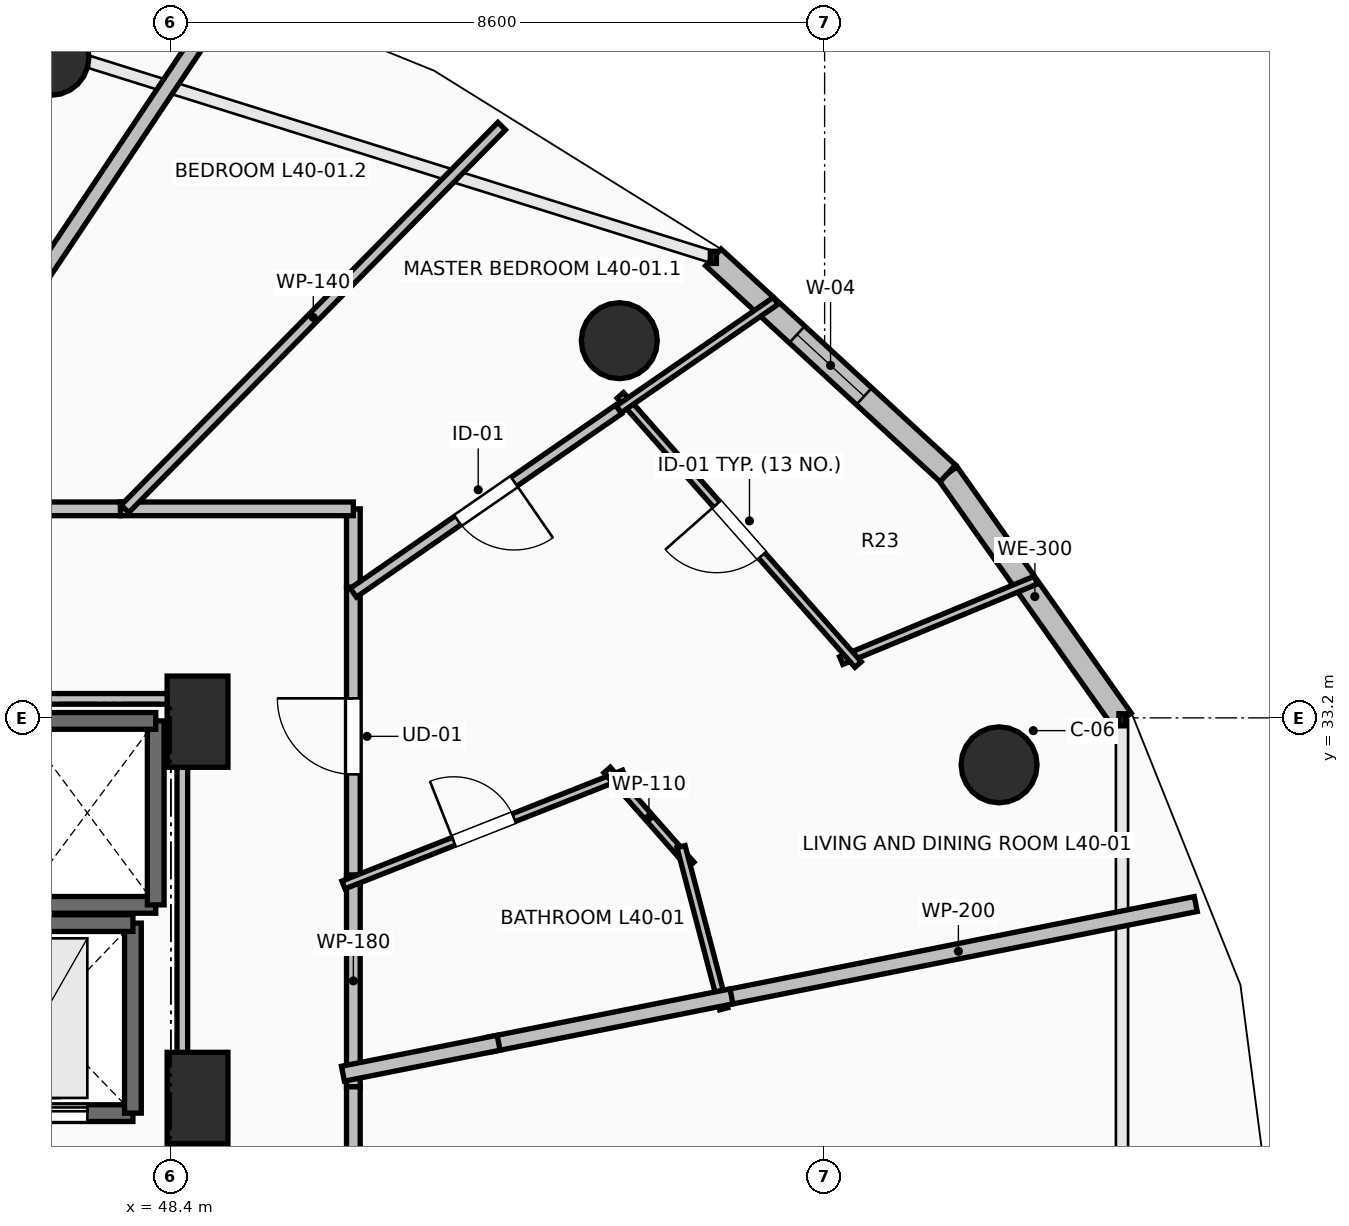
"""IFC4 building model, lengths in metres.
Left out: names, types, materials, properties, quantities, classifications, styles, units other than length and angle.
Written with IfcOpenShell. Run it as: python <this file> out.ifc"""

import sys

from ifc_helpers import new_model, si_unit, direction, frame, frame_2d, origin, origin_2d, place, context, subcontext, project, spatial, rectangle, circle, extrude, element, fill, save


model = new_model("IFC4")
c1 = context("Model", 3, precision=1e-05, world=origin(), true_north=direction((0.0, 1.0)))
c2 = subcontext(c1, "Body", "Model", "MODEL_VIEW")
j1 = project(units=[si_unit("LENGTHUNIT", "METRE"), si_unit("PLANEANGLEUNIT", "RADIAN")], contexts=[c1])
p1 = place(None, origin())
s1 = spatial("IfcSite", under=j1, at=p1, CompositionType="ELEMENT")
p2 = place(p1, origin())
s2 = spatial("IfcBuilding", under=s1, at=p2, CompositionType="ELEMENT")
p3 = place(p2, frame((0.0, 0.0, 150.1)))
s3 = spatial("IfcBuildingStorey", under=s2, at=p3, CompositionType="ELEMENT", Elevation=150.1)
for number, where, z_axis, x_axis in (
    (1, (59.295, 32.582, 0.0), (0.0, 0.0, 1.0), (0.924, 0.383, 0.0)),
    (2, (54.299, 38.162, 0.0), (0.0, 0.0, 1.0), (0.707, 0.707, 0.0)),
    (3, (46.821, 41.891, 0.0), (0.0, 0.0, 1.0), (0.383, 0.924, 0.0)),
):
    element("IfcColumn", number, at=place(p3, frame(where, z_axis=z_axis, x_axis=x_axis)), inside=s3, PredefinedType="COLUMN", context=c2, shape_type="SweptSolid", body=[
        extrude(circle(Radius=0.5, at=origin_2d()), origin(), (0.0, 0.0, 1.0), 3.5),
    ])
for number, where, z_axis, x_axis in (
    (4, (48.75, 33.15, 0.0), (0.0, 0.0, 1.0), (1.0, 0.0, 0.0)),
    (5, (48.75, 28.2, 0.0), (0.0, 0.0, 1.0), (1.0, 0.0, 0.0)),
):
    element("IfcColumn", number, at=place(p3, frame(where, z_axis=z_axis, x_axis=x_axis)), inside=s3, PredefinedType="PILASTER", context=c2, shape_type="SweptSolid", body=[
        extrude(rectangle(XDim=0.8, YDim=1.2, at=origin_2d()), origin(), (0.0, 0.0, 1.0), 3.5),
    ])
p4 = place(p3, frame((60.912, 33.175, 0.0), z_axis=(0.0, 0.0, 1.0), x_axis=(-0.577269753207, 0.816553508371, 0.0)))
e6 = element("IfcWall", 6, at=p4, inside=s3, PredefinedType="STANDARD", context=c2, shape_type="SweptSolid", body=[
    extrude(rectangle(XDim=3.97, YDim=0.3, at=frame_2d((1.985, 0.0))), origin(), (0.0, 0.0, 1.0), 3.24),
])
p5 = place(p3, frame((58.62, 36.417, 0.0), z_axis=(0.0, 0.0, 1.0), x_axis=(-0.735477154165, 0.677549522693, 0.0)))
e7 = element("IfcWall", 7, at=p5, inside=s3, PredefinedType="STANDARD", context=c2, shape_type="SweptSolid", body=[
    extrude(rectangle(XDim=4.194, YDim=0.3, at=frame_2d((2.097, 0.0))), origin(), (0.0, 0.0, 1.0), 3.24),
])
p6 = place(p5, frame((1.497, 0.0, 0.85)))
e8 = element("IfcOpeningElement", 8, at=p6, cuts=e7, PredefinedType="OPENING", context=c2, shape_type="SweptSolid", body=[
    extrude(rectangle(XDim=1.2, YDim=2.1, at=frame_2d((0.6, 1.05))), frame((0.0, 0.165, 0.0), z_axis=(0.0, -1.0, 0.0), x_axis=(1.0, 0.0, 0.0)), (0.0, 0.0, 1.0), 0.33),
])
p7 = place(p3, frame((46.4, 30.74, 0.0), z_axis=(0.0, 0.0, 1.0), x_axis=(1.0, 0.0, 0.0)))
e9 = element("IfcWall", 9, at=p7, inside=s3, PredefinedType="SOLIDWALL", context=c2, shape_type="SweptSolid", body=[
    extrude(rectangle(XDim=1.8, YDim=0.22, at=frame_2d((0.9, 0.0))), origin(), (0.0, 0.0, 1.0), 3.24),
])
p8 = place(p3, frame((48.2, 30.74, 0.0), z_axis=(0.0, 0.0, 1.0), x_axis=(0.0, 1.0, 0.0)))
e10 = element("IfcWall", 10, at=p8, inside=s3, PredefinedType="SOLIDWALL", context=c2, shape_type="SweptSolid", body=[
    extrude(rectangle(XDim=2.42, YDim=0.22, at=frame_2d((1.21, 0.0))), origin(), (0.0, 0.0, 1.0), 3.24),
])
p9 = place(p3, frame((48.2, 33.16, 0.0), z_axis=(0.0, 0.0, 1.0), x_axis=(-1.0, 0.0, 0.0)))
e11 = element("IfcWall", 11, at=p9, inside=s3, PredefinedType="SOLIDWALL", context=c2, shape_type="SweptSolid", body=[
    extrude(rectangle(XDim=1.8, YDim=0.22, at=frame_2d((0.9, 0.0))), origin(), (0.0, 0.0, 1.0), 3.24),
])
p10 = place(p3, frame((45.5, 28.0, 0.0), z_axis=(0.0, 0.0, 1.0), x_axis=(1.0, 0.0, 0.0)))
e12 = element("IfcWall", 12, at=p10, inside=s3, PredefinedType="SHEAR", context=c2, shape_type="SweptSolid", body=[
    extrude(rectangle(XDim=2.4, YDim=0.22, at=frame_2d((1.2, 0.0))), origin(), (0.0, 0.0, 1.0), 3.24),
])
p11 = place(p10, frame((0.6, 0.0, 0.0)))
e13 = element("IfcOpeningElement", 13, at=p11, cuts=e12, PredefinedType="OPENING", context=c2, shape_type="SweptSolid", body=[
    extrude(rectangle(XDim=1.2, YDim=2.2, at=frame_2d((0.6, 1.1))), frame((0.0, 0.125, 0.0), z_axis=(0.0, -1.0, 0.0), x_axis=(1.0, 0.0, 0.0)), (0.0, 0.0, 1.0), 0.25),
])
p12 = place(p3, frame((47.9, 28.0, 0.0), z_axis=(0.0, 0.0, 1.0), x_axis=(0.0, 1.0, 0.0)))
e14 = element("IfcWall", 14, at=p12, inside=s3, PredefinedType="SHEAR", context=c2, shape_type="SweptSolid", body=[
    extrude(rectangle(XDim=2.5, YDim=0.22, at=frame_2d((1.25, 0.0))), origin(), (0.0, 0.0, 1.0), 3.24),
])
p13 = place(p3, frame((47.9, 30.5, 0.0), z_axis=(0.0, 0.0, 1.0), x_axis=(-1.0, 0.0, 0.0)))
e15 = element("IfcWall", 15, at=p13, inside=s3, PredefinedType="SHEAR", context=c2, shape_type="SweptSolid", body=[
    extrude(rectangle(XDim=2.4, YDim=0.22, at=frame_2d((1.2, 0.0))), origin(), (0.0, 0.0, 1.0), 3.24),
])
p14 = place(p3, frame((48.45, 23.95, 0.0), z_axis=(0.0, 0.0, 1.0), x_axis=(0.0, 1.0, 0.0)))
e16 = element("IfcWall", 16, at=p14, inside=s3, PredefinedType="PARTITIONING", context=c2, shape_type="SweptSolid", body=[
    extrude(rectangle(XDim=4.05, YDim=0.18, at=frame_2d((2.025, 0.0))), origin(), (0.0, 0.0, 1.0), 3.24),
])
p15 = place(p14, frame((1.425, 0.0, 0.0)))
e17 = element("IfcOpeningElement", 17, at=p15, cuts=e16, PredefinedType="OPENING", context=c2, shape_type="SweptSolid", body=[
    extrude(rectangle(XDim=1.2, YDim=2.15, at=frame_2d((0.6, 1.075))), frame((0.0, 0.105, 0.0), z_axis=(0.0, -1.0, 0.0), x_axis=(1.0, 0.0, 0.0)), (0.0, 0.0, 1.0), 0.21),
])
p16 = place(p3, frame((50.8, 30.994, 0.0), z_axis=(0.0, 0.0, 1.0), x_axis=(0.0, 1.0, 0.0)))
e18 = element("IfcWall", 18, at=p16, inside=s3, PredefinedType="PARTITIONING", context=c2, shape_type="SweptSolid", body=[
    extrude(rectangle(XDim=3.926, YDim=0.18, at=frame_2d((1.963, 0.0))), origin(), (0.0, 0.0, 1.0), 2.432),
])
p17 = place(p16, frame((1.463, 0.0, 0.0)))
e19 = element("IfcOpeningElement", 19, at=p17, cuts=e18, PredefinedType="OPENING", context=c2, shape_type="SweptSolid", body=[
    extrude(rectangle(XDim=1.0, YDim=2.15, at=frame_2d((0.5, 1.075))), frame((0.0, 0.105, 0.0), z_axis=(0.0, -1.0, 0.0), x_axis=(1.0, 0.0, 0.0)), (0.0, 0.0, 1.0), 0.21),
])
p18 = place(p3, frame((50.8, 28.346, 0.0), z_axis=(0.0, 0.0, 1.0), x_axis=(0.0, 1.0, 0.0)))
e20 = element("IfcWall", 20, at=p18, inside=s3, PredefinedType="PARTITIONING", context=c2, shape_type="SweptSolid", body=[
    extrude(rectangle(XDim=2.788, YDim=0.18, at=frame_2d((1.394, 0.0))), origin(), (0.0, 0.0, 1.0), 3.24),
])
p19 = place(p3, frame((50.8, 34.92, 0.0), z_axis=(0.0, 0.0, 1.0), x_axis=(0.0, 1.0, 0.0)))
e21 = element("IfcWall", 21, at=p19, inside=s3, PredefinedType="PARTITIONING", context=c2, shape_type="SweptSolid", body=[
    extrude(rectangle(XDim=1.03, YDim=0.18, at=frame_2d((0.515, 0.0))), origin(), (0.0, 0.0, 1.0), 2.432),
])
p20 = place(p3, frame((50.8, 35.95, 0.0), z_axis=(0.0, 0.0, 1.0), x_axis=(-1.0, 0.0, 0.0)))
e22 = element("IfcWall", 22, at=p20, inside=s3, PredefinedType="PARTITIONING", context=c2, shape_type="SweptSolid", body=[
    extrude(rectangle(XDim=3.065, YDim=0.18, at=frame_2d((1.532, 0.0))), origin(), (0.0, 0.0, 1.0), 2.432),
])
p21 = place(p3, frame((47.735, 35.95, 0.0), z_axis=(0.0, 0.0, 1.0), x_axis=(-1.0, 0.0, 0.0)))
e23 = element("IfcWall", 23, at=p21, inside=s3, PredefinedType="PARTITIONING", context=c2, shape_type="SweptSolid", body=[
    extrude(rectangle(XDim=3.147, YDim=0.18, at=frame_2d((1.574, 0.0))), origin(), (0.0, 0.0, 1.0), 2.886),
])
p22 = place(p21, frame((1.148, 0.0, 0.0)))
e24 = element("IfcOpeningElement", 24, at=p22, cuts=e23, PredefinedType="OPENING", context=c2, shape_type="SweptSolid", body=[
    extrude(rectangle(XDim=0.85, YDim=2.1, at=frame_2d((0.425, 1.05))), frame((0.0, 0.105, 0.0), z_axis=(0.0, -1.0, 0.0), x_axis=(1.0, 0.0, 0.0)), (0.0, 0.0, 1.0), 0.21),
])
p23 = place(p3, frame((50.8, 27.25, 0.0), z_axis=(0.0, 0.0, 1.0), x_axis=(0.0, 1.0, 0.0)))
e25 = element("IfcWall", 25, at=p23, inside=s3, PredefinedType="PARTITIONING", context=c2, shape_type="SweptSolid", body=[
    extrude(rectangle(XDim=1.096, YDim=0.18, at=frame_2d((0.548, 0.0))), origin(), (0.0, 0.0, 1.0), 2.432),
])
p24 = place(p3, frame((50.67, 31.003, 0.0), z_axis=(0.0, 0.0, 1.0), x_axis=(0.930092731386, 0.367324803169, 0.0)))
e26 = element("IfcWall", 26, at=p24, inside=s3, PredefinedType="PARTITIONING", context=c2, shape_type="SweptSolid", body=[
    extrude(rectangle(XDim=3.969, YDim=0.11, at=frame_2d((1.984, 0.0))), origin(), (0.0, 0.0, 1.0), 2.886),
])
p25 = place(p24, frame((1.559, 0.0, 0.0)))
e27 = element("IfcOpeningElement", 27, at=p25, cuts=e26, PredefinedType="OPENING", context=c2, shape_type="SweptSolid", body=[
    extrude(rectangle(XDim=0.85, YDim=2.1, at=frame_2d((0.425, 1.05))), frame((0.0, 0.07, 0.0), z_axis=(0.0, -1.0, 0.0), x_axis=(1.0, 0.0, 0.0)), (0.0, 0.0, 1.0), 0.14),
])
p26 = place(p3, frame((54.138, 32.514, 0.0), z_axis=(0.0, 0.0, 1.0), x_axis=(0.661645897528, -0.749816448396, 0.0)))
e28 = element("IfcWall", 28, at=p26, inside=s3, PredefinedType="PARTITIONING", context=c2, shape_type="SweptSolid", body=[
    extrude(rectangle(XDim=1.664, YDim=0.11, at=frame_2d((0.832, 0.0))), origin(), (0.0, 0.0, 1.0), 3.24),
])
p27 = place(p3, frame((55.111, 31.506, 0.0), z_axis=(0.0, 0.0, 1.0), x_axis=(0.254389812051, -0.967101764823, 0.0)))
e29 = element("IfcWall", 29, at=p27, inside=s3, PredefinedType="PARTITIONING", context=c2, shape_type="SweptSolid", body=[
    extrude(rectangle(XDim=2.206, YDim=0.11, at=frame_2d((1.103, 0.0))), origin(), (0.0, 0.0, 1.0), 3.24),
])
p28 = place(p3, frame((59.778, 35.012, 0.0), z_axis=(0.0, 0.0, 1.0), x_axis=(-0.924067287951, -0.382229835751, 0.0)))
e30 = element("IfcWall", 30, at=p28, inside=s3, PredefinedType="PARTITIONING", context=c2, shape_type="SweptSolid", body=[
    extrude(rectangle(XDim=2.77, YDim=0.11, at=frame_2d((1.385, 0.0))), origin(), (0.0, 0.0, 1.0), 2.728),
])
p29 = place(p3, frame((57.441, 33.902, 0.0), z_axis=(0.0, 0.0, 1.0), x_axis=(-0.662122223318, 0.749395864272, 0.0)))
e31 = element("IfcWall", 31, at=p29, inside=s3, PredefinedType="PARTITIONING", context=c2, shape_type="SweptSolid", body=[
    extrude(rectangle(XDim=4.725, YDim=0.11, at=frame_2d((2.362, 0.0))), origin(), (0.0, 0.0, 1.0), 3.24),
])
p30 = place(p29, frame((1.912, 0.0, 0.0)))
e32 = element("IfcOpeningElement", 32, at=p30, cuts=e31, PredefinedType="OPENING", context=c2, shape_type="SweptSolid", body=[
    extrude(rectangle(XDim=0.9, YDim=2.1, at=frame_2d((0.45, 1.05))), frame((0.0, 0.07, 0.0), z_axis=(0.0, -1.0, 0.0), x_axis=(1.0, 0.0, 0.0)), (0.0, 0.0, 1.0), 0.14),
])
p31 = place(p3, frame((54.29, 37.258, 0.0), z_axis=(0.0, 0.0, 1.0), x_axis=(0.822632807799, 0.568573006335, 0.0)))
e33 = element("IfcWall", 33, at=p31, inside=s3, PredefinedType="PARTITIONING", context=c2, shape_type="SweptSolid", body=[
    extrude(rectangle(XDim=2.512, YDim=0.11, at=frame_2d((1.256, 0.0))), origin(), (0.0, 0.0, 1.0), 2.728),
])
p32 = place(p3, frame((54.29, 37.259, 0.0), z_axis=(0.0, 0.0, 1.0), x_axis=(-0.822672586971, -0.568515448027, 0.0)))
e34 = element("IfcWall", 34, at=p32, inside=s3, PredefinedType="PARTITIONING", context=c2, shape_type="SweptSolid", body=[
    extrude(rectangle(XDim=4.242, YDim=0.14, at=frame_2d((2.121, 0.0))), origin(), (0.0, 0.0, 1.0), 2.432),
])
p33 = place(p32, frame((1.671, 0.0, 0.0)))
e35 = element("IfcOpeningElement", 35, at=p33, cuts=e34, PredefinedType="OPENING", context=c2, shape_type="SweptSolid", body=[
    extrude(rectangle(XDim=0.9, YDim=2.1, at=frame_2d((0.45, 1.05))), frame((0.0, 0.085, 0.0), z_axis=(0.0, -1.0, 0.0), x_axis=(1.0, 0.0, 0.0)), (0.0, 0.0, 1.0), 0.17),
])
p34 = place(p3, frame((55.637, 29.508, 0.0), z_axis=(0.0, 0.0, 1.0), x_axis=(0.98077041661, 0.19516503248, 0.0)))
e36 = element("IfcWall", 36, at=p34, inside=s3, PredefinedType="PARTITIONING", context=c2, shape_type="SweptSolid", body=[
    extrude(rectangle(XDim=6.369, YDim=0.2, at=frame_2d((3.184, 0.0))), origin(), (0.0, 0.0, 1.0), 2.728),
])
p35 = place(p3, frame((52.574, 28.899, 0.0), z_axis=(0.0, 0.0, 1.0), x_axis=(0.980781574696, 0.195108950939, 0.0)))
e37 = element("IfcWall", 37, at=p35, inside=s3, PredefinedType="PARTITIONING", context=c2, shape_type="SweptSolid", body=[
    extrude(rectangle(XDim=3.263, YDim=0.2, at=frame_2d((1.632, 0.0))), origin(), (0.0, 0.0, 1.0), 2.886),
])
p36 = place(p3, frame((50.663, 28.519, 0.0), z_axis=(0.0, 0.0, 1.0), x_axis=(0.980804842296, 0.194991951961, 0.0)))
e38 = element("IfcWall", 38, at=p36, inside=s3, PredefinedType="PARTITIONING", context=c2, shape_type="SweptSolid", body=[
    extrude(rectangle(XDim=2.088, YDim=0.2, at=frame_2d((1.044, 0.0))), origin(), (0.0, 0.0, 1.0), 2.886),
])
p37 = place(p3, frame((52.751, 40.985, 0.0), z_axis=(0.0, 0.0, 1.0), x_axis=(-0.701486551238, -0.712682691268, 0.0)))
e39 = element("IfcWall", 39, at=p37, inside=s3, PredefinedType="PARTITIONING", context=c2, shape_type="SweptSolid", body=[
    extrude(rectangle(XDim=7.065, YDim=0.14, at=frame_2d((3.533, 0.0))), origin(), (0.0, 0.0, 1.0), 2.432),
])
p38 = place(p3, frame((49.131, 42.659, 0.0), z_axis=(0.0, 0.0, 1.0), x_axis=(-0.555600584712, -0.831449331149, 0.0)))
e40 = element("IfcWall", 40, at=p38, inside=s3, PredefinedType="PARTITIONING", context=c2, shape_type="SweptSolid", body=[
    extrude(rectangle(XDim=8.069, YDim=0.2, at=frame_2d((4.035, 0.0))), origin(), (0.0, 0.0, 1.0), 2.432),
])
p39 = place(p3, frame((48.55, 28.196, 0.0), z_axis=(0.0, 0.0, 1.0), x_axis=(0.0, 1.0, 0.0)))
e41 = element("IfcWall", 41, at=p39, inside=s3, PredefinedType="PARTITIONING", context=c2, shape_type="SweptSolid", body=[
    extrude(rectangle(XDim=5.254, YDim=0.14, at=frame_2d((2.627, 0.0))), origin(), (0.0, 0.0, 1.0), 2.432),
])
p40 = place(p3, frame((48.55, 33.45, 0.0), z_axis=(0.0, 0.0, 1.0), x_axis=(-1.0, 0.0, 0.0)))
e42 = element("IfcWall", 42, at=p40, inside=s3, PredefinedType="PARTITIONING", context=c2, shape_type="SweptSolid", body=[
    extrude(rectangle(XDim=4.21, YDim=0.14, at=frame_2d((2.105, 0.0))), origin(), (0.0, 0.0, 1.0), 2.432),
])
p41 = place(p6, origin())
e43 = element("IfcWindow", 43, at=p41, inside=s3, PartitioningType="SINGLE_PANEL", PredefinedType="WINDOW", context=c2, shape_type="SweptSolid", body=[
    extrude(rectangle(XDim=1.2, YDim=2.1, at=frame_2d((0.6, 1.05))), frame((0.0, 0.03, 0.0), z_axis=(0.0, -1.0, 0.0), x_axis=(1.0, 0.0, 0.0)), (0.0, 0.0, 1.0), 0.06),
])
fill(e8, e43)
p42 = place(p11, origin())
e44 = element("IfcDoor", 44, at=p42, inside=s3, OperationType="SLIDING_TO_LEFT", PredefinedType="DOOR", context=c2, shape_type="SweptSolid", body=[
    extrude(rectangle(XDim=1.2, YDim=2.2, at=frame_2d((0.6, 1.1))), frame((0.0, 0.025, 0.0), z_axis=(0.0, -1.0, 0.0), x_axis=(1.0, 0.0, 0.0)), (0.0, 0.0, 1.0), 0.05),
])
fill(e13, e44)
p43 = place(p17, origin())
e45 = element("IfcDoor", 45, at=p43, inside=s3, OperationType="SINGLE_SWING_RIGHT", PredefinedType="DOOR", context=c2, shape_type="SweptSolid", body=[
    extrude(rectangle(XDim=1.0, YDim=2.15, at=frame_2d((0.5, 1.075))), frame((0.0, 0.025, 0.0), z_axis=(0.0, -1.0, 0.0), x_axis=(1.0, 0.0, 0.0)), (0.0, 0.0, 1.0), 0.05),
])
fill(e19, e45)
p44 = place(p25, origin())
e46 = element("IfcDoor", 46, at=p44, inside=s3, OperationType="SINGLE_SWING_LEFT", PredefinedType="DOOR", context=c2, shape_type="SweptSolid", body=[
    extrude(rectangle(XDim=0.85, YDim=2.1, at=frame_2d((0.425, 1.05))), frame((0.0, 0.025, 0.0), z_axis=(0.0, -1.0, 0.0), x_axis=(1.0, 0.0, 0.0)), (0.0, 0.0, 1.0), 0.05),
])
fill(e27, e46)
p45 = place(p30, origin())
e47 = element("IfcDoor", 47, at=p45, inside=s3, OperationType="SINGLE_SWING_RIGHT", PredefinedType="DOOR", context=c2, shape_type="SweptSolid", body=[
    extrude(rectangle(XDim=0.9, YDim=2.1, at=frame_2d((0.45, 1.05))), frame((0.0, 0.025, 0.0), z_axis=(0.0, -1.0, 0.0), x_axis=(1.0, 0.0, 0.0)), (0.0, 0.0, 1.0), 0.05),
])
fill(e32, e47)
p46 = place(p33, origin())
e48 = element("IfcDoor", 48, at=p46, inside=s3, OperationType="SINGLE_SWING_LEFT", PredefinedType="DOOR", context=c2, shape_type="SweptSolid", body=[
    extrude(rectangle(XDim=0.9, YDim=2.1, at=frame_2d((0.45, 1.05))), frame((0.0, 0.025, 0.0), z_axis=(0.0, -1.0, 0.0), x_axis=(1.0, 0.0, 0.0)), (0.0, 0.0, 1.0), 0.05),
])
fill(e35, e48)
save(model, sys.argv[1])
